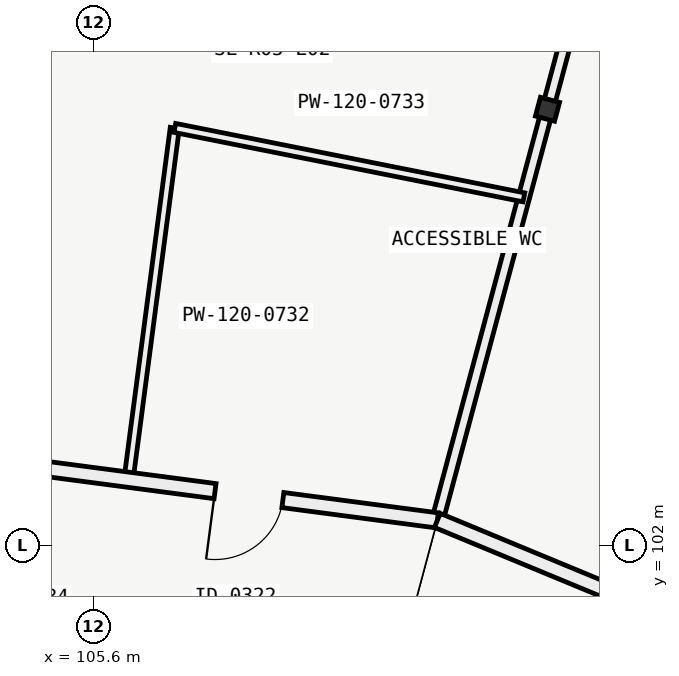
"""IFC4 building model, lengths in metres.
Left out: names, types, materials, properties, quantities, classifications, styles, units other than length and angle.
Written with IfcOpenShell. Run it as: python <this file> out.ifc"""

import sys

from ifc_helpers import new_model, si_unit, direction, frame, frame_2d, origin, origin_2d, place, context, subcontext, project, spatial, rectangle, i_section, extrude, element, fill, save


model = new_model("IFC4")
c1 = context("Model", 3, precision=1e-05, world=origin(), true_north=direction((0.0, 1.0)))
c2 = subcontext(c1, "Body", "Model", "MODEL_VIEW")
j1 = project(units=[si_unit("LENGTHUNIT", "METRE"), si_unit("PLANEANGLEUNIT", "RADIAN")], contexts=[c1])
p1 = place(None, origin())
s1 = spatial("IfcSite", under=j1, at=p1, CompositionType="ELEMENT")
p2 = place(p1, origin())
s2 = spatial("IfcBuilding", under=s1, at=p2, CompositionType="ELEMENT")
p3 = place(p2, frame((0.0, 0.0, 9.6)))
s3 = spatial("IfcBuildingStorey", under=s2, at=p3, CompositionType="ELEMENT", Elevation=9.6)
p4 = place(p3, frame((111.576, 107.739, 0.0), z_axis=(0.0, 0.0, 1.0), x_axis=(0.258819045103, 0.965925826289, 0.0)))
e1 = element("IfcColumn", 1, at=p4, inside=s3, PredefinedType="COLUMN", context=c2, shape_type="SweptSolid", body=[
    extrude(i_section(OverallWidth=0.256, OverallDepth=0.26, WebThickness=0.01, FlangeThickness=0.017, FilletRadius=0.014, at=origin_2d()), origin(), (0.0, 0.0, 1.0), 4.2),
])
p5 = place(p3, frame((110.127, 102.33, 0.0), z_axis=(0.0, 0.0, 1.0), x_axis=(0.258810530041, 0.965928107853, 0.0)))
e2 = element("IfcWall", 2, at=p5, inside=s3, PredefinedType="PARTITIONING", context=c2, shape_type="SweptSolid", body=[
    extrude(rectangle(XDim=14.48, YDim=0.15, at=frame_2d((7.24, 0.0))), origin(), (0.0, 0.0, 1.0), 3.397),
])
p6 = place(p3, frame((106.063, 102.865, 0.0), z_axis=(0.0, 0.0, 1.0), x_axis=(0.130526207551, 0.991444859356, 0.0)))
e3 = element("IfcWall", 3, at=p6, inside=s3, PredefinedType="PARTITIONING", context=c2, shape_type="SweptSolid", body=[
    extrude(rectangle(XDim=4.669, YDim=0.12, at=frame_2d((2.334, 0.0))), origin(), (0.0, 0.0, 1.0), 3.727),
])
p7 = place(p3, frame((111.266, 106.58, 0.0), z_axis=(0.0, 0.0, 1.0), x_axis=(-0.980784676414, 0.195093358449, 0.0)))
e4 = element("IfcWall", 4, at=p7, inside=s3, PredefinedType="PARTITIONING", context=c2, shape_type="SweptSolid", body=[
    extrude(rectangle(XDim=4.683, YDim=0.12, at=frame_2d((2.341, 0.0))), origin(), (0.0, 0.0, 1.0), 3.402),
])
p8 = place(p3, frame((110.127, 102.33, 0.0), z_axis=(0.0, 0.0, 1.0), x_axis=(-0.991446589332, 0.130513066404, 0.0)))
e5 = element("IfcWall", 5, at=p8, inside=s3, PredefinedType="PARTITIONING", context=c2, shape_type="SweptSolid", body=[
    extrude(rectangle(XDim=8.197, YDim=0.2, at=frame_2d((4.099, 0.0))), origin(), (0.0, 0.0, 1.0), 3.402),
])
p9 = place(p8, frame((2.05, 0.0, 0.0)))
e6 = element("IfcOpeningElement", 6, at=p9, cuts=e5, PredefinedType="OPENING", context=c2, shape_type="SweptSolid", body=[
    extrude(rectangle(XDim=0.9, YDim=2.05, at=frame_2d((0.45, 1.025))), frame((0.0, 0.11, 0.0), z_axis=(0.0, -1.0, 0.0), x_axis=(1.0, 0.0, 0.0)), (0.0, 0.0, 1.0), 0.22),
])
p10 = place(p8, frame((6.15, 0.0, 0.0)))
e7 = element("IfcOpeningElement", 7, at=p10, cuts=e5, PredefinedType="OPENING", context=c2, shape_type="SweptSolid", body=[
    extrude(rectangle(XDim=1.5, YDim=2.2, at=frame_2d((0.75, 1.1))), frame((0.0, 0.11, 0.0), z_axis=(0.0, -1.0, 0.0), x_axis=(1.0, 0.0, 0.0)), (0.0, 0.0, 1.0), 0.22),
])
p11 = place(p3, frame((117.7, 99.193, 0.0), z_axis=(0.0, 0.0, 1.0), x_axis=(-0.923874167149, 0.382696385238, 0.0)))
e8 = element("IfcWall", 8, at=p11, inside=s3, PredefinedType="PARTITIONING", context=c2, shape_type="SweptSolid", body=[
    extrude(rectangle(XDim=8.197, YDim=0.2, at=frame_2d((4.099, 0.0))), origin(), (0.0, 0.0, 1.0), 3.402),
])
p12 = place(p9, origin())
e9 = element("IfcDoor", 9, at=p12, inside=s3, OperationType="SINGLE_SWING_RIGHT", PredefinedType="DOOR", context=c2, shape_type="SweptSolid", body=[
    extrude(rectangle(XDim=0.9, YDim=2.05, at=frame_2d((0.45, 1.025))), frame((0.0, 0.025, 0.0), z_axis=(0.0, -1.0, 0.0), x_axis=(1.0, 0.0, 0.0)), (0.0, 0.0, 1.0), 0.05),
])
fill(e6, e9)
save(model, sys.argv[1])
